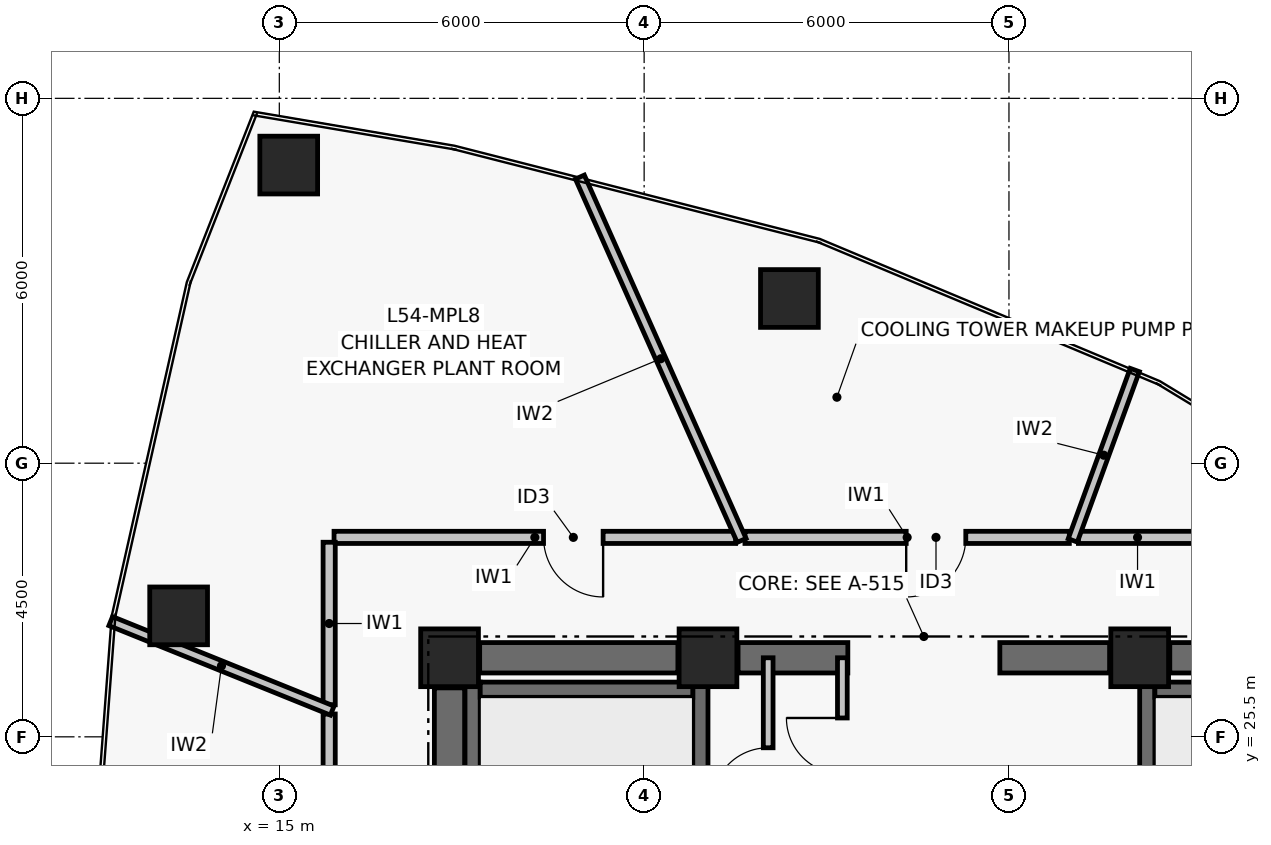
"""IFC4 building model, lengths in metres.
Left out: names, types, materials, properties, quantities, classifications, styles, units other than length and angle.
Written with IfcOpenShell. Run it as: python <this file> out.ifc"""

import sys

from ifc_helpers import new_model, si_unit, direction, frame, frame_2d, origin, origin_2d, place, context, subcontext, project, spatial, rectangle, hollow_rectangle, extrude, element, fill, save


model = new_model("IFC4")
c1 = context("Model", 3, precision=1e-05, world=origin(), true_north=direction((0.0, 1.0)))
c2 = subcontext(c1, "Body", "Model", "MODEL_VIEW")
j1 = project(units=[si_unit("LENGTHUNIT", "METRE"), si_unit("PLANEANGLEUNIT", "RADIAN")], contexts=[c1])
p1 = place(None, origin())
s1 = spatial("IfcSite", under=j1, at=p1, CompositionType="ELEMENT")
p2 = place(p1, origin())
s2 = spatial("IfcBuilding", under=s1, at=p2, CompositionType="ELEMENT")
p3 = place(p2, frame((0.0, 0.0, 213.84)))
s3 = spatial("IfcBuildingStorey", under=s2, at=p3, CompositionType="ELEMENT", Elevation=213.84)
for number, where, z_axis, x_axis in (
    (1, (17.8, 26.8, 0.0), (0.0, 0.0, 1.0), (1.0, 0.0, 0.0)),
    (2, (22.05, 26.8, 0.0), (0.0, 0.0, 1.0), (1.0, 0.0, 0.0)),
    (3, (29.15, 26.8, 0.0), (0.0, 0.0, 1.0), (1.0, 0.0, 0.0)),
):
    element("IfcColumn", number, at=place(p3, frame(where, z_axis=z_axis, x_axis=x_axis)), inside=s3, PredefinedType="COLUMN", context=c2, shape_type="SweptSolid", body=[
        extrude(rectangle(XDim=0.95, YDim=0.95, at=origin_2d()), origin(), (0.0, 0.0, 1.0), 5.7),
    ])
p4 = place(p3, frame((18.295, 26.8, 0.0), z_axis=(0.0, 0.0, 1.0), x_axis=(1.0, 0.0, 0.0)))
e4 = element("IfcWall", 4, at=p4, inside=s3, PredefinedType="SHEAR", context=c2, shape_type="SweptSolid", body=[
    extrude(rectangle(XDim=3.26, YDim=0.5, at=frame_2d((1.63, 0.0))), origin(), (0.0, 0.0, 1.0), 5.48),
])
p5 = place(p3, frame((22.545, 26.8, 0.0), z_axis=(0.0, 0.0, 1.0), x_axis=(1.0, 0.0, 0.0)))
e5 = element("IfcWall", 5, at=p5, inside=s3, PredefinedType="SHEAR", context=c2, shape_type="SweptSolid", body=[
    extrude(rectangle(XDim=1.805, YDim=0.5, at=frame_2d((0.903, 0.0))), origin(), (0.0, 0.0, 1.0), 5.48),
])
p6 = place(p3, frame((26.85, 26.8, 0.0), z_axis=(0.0, 0.0, 1.0), x_axis=(1.0, 0.0, 0.0)))
e6 = element("IfcWall", 6, at=p6, inside=s3, PredefinedType="SHEAR", context=c2, shape_type="SweptSolid", body=[
    extrude(rectangle(XDim=1.805, YDim=0.5, at=frame_2d((0.902, 0.0))), origin(), (0.0, 0.0, 1.0), 5.48),
])
p7 = place(p3, frame((29.645, 26.8, 0.0), z_axis=(0.0, 0.0, 1.0), x_axis=(1.0, 0.0, 0.0)))
e7 = element("IfcWall", 7, at=p7, inside=s3, PredefinedType="SHEAR", context=c2, shape_type="SweptSolid", body=[
    extrude(rectangle(XDim=3.26, YDim=0.5, at=frame_2d((1.63, 0.0))), origin(), (0.0, 0.0, 1.0), 5.48),
])
p8 = place(p3, frame((17.8, 17.695, 0.0), z_axis=(0.0, 0.0, 1.0), x_axis=(0.0, 1.0, 0.0)))
e8 = element("IfcWall", 8, at=p8, inside=s3, PredefinedType="SHEAR", context=c2, shape_type="SweptSolid", body=[
    extrude(rectangle(XDim=8.61, YDim=0.5, at=frame_2d((4.305, 0.0))), origin(), (0.0, 0.0, 1.0), 5.48),
])
p9 = place(p3, frame((18.179, 17.6, 0.0), z_axis=(0.0, 0.0, 1.0), x_axis=(0.0, 1.0, 0.0)))
e9 = element("IfcWall", 9, at=p9, inside=s3, PredefinedType="SHEAR", context=c2, shape_type="SweptSolid", body=[
    extrude(rectangle(XDim=8.8, YDim=0.25, at=frame_2d((4.4, 0.0))), origin(), (0.0, 0.0, 1.0), 5.48),
])
p10 = place(p3, frame((21.925, 17.6, 0.0), z_axis=(0.0, 0.0, 1.0), x_axis=(0.0, 1.0, 0.0)))
e10 = element("IfcWall", 10, at=p10, inside=s3, PredefinedType="SHEAR", context=c2, shape_type="SweptSolid", body=[
    extrude(rectangle(XDim=8.8, YDim=0.25, at=frame_2d((4.4, 0.0))), origin(), (0.0, 0.0, 1.0), 5.48),
])
p11 = place(p10, frame((0.35, 0.0, 0.0)))
e11 = element("IfcOpeningElement", 11, at=p11, cuts=e10, PredefinedType="OPENING", context=c2, shape_type="SweptSolid", body=[
    extrude(rectangle(XDim=1.05, YDim=2.08, at=frame_2d((0.525, 1.04))), frame((0.0, 0.135, 0.0), z_axis=(0.0, -1.0, 0.0), x_axis=(1.0, 0.0, 0.0)), (0.0, 0.0, 1.0), 0.27),
])
p12 = place(p3, frame((18.304, 26.275, 0.0), z_axis=(0.0, 0.0, 1.0), x_axis=(1.0, 0.0, 0.0)))
e12 = element("IfcWall", 12, at=p12, inside=s3, PredefinedType="SHEAR", context=c2, shape_type="SweptSolid", body=[
    extrude(rectangle(XDim=3.496, YDim=0.25, at=frame_2d((1.748, 0.0))), origin(), (0.0, 0.0, 1.0), 5.48),
])
p13 = place(p3, frame((29.275, 17.6, 0.0), z_axis=(0.0, 0.0, 1.0), x_axis=(0.0, 1.0, 0.0)))
e13 = element("IfcWall", 13, at=p13, inside=s3, PredefinedType="SHEAR", context=c2, shape_type="SweptSolid", body=[
    extrude(rectangle(XDim=8.8, YDim=0.25, at=frame_2d((4.4, 0.0))), origin(), (0.0, 0.0, 1.0), 5.48),
])
p14 = place(p13, frame((0.35, 0.0, 0.0)))
e14 = element("IfcOpeningElement", 14, at=p14, cuts=e13, PredefinedType="OPENING", context=c2, shape_type="SweptSolid", body=[
    extrude(rectangle(XDim=1.05, YDim=2.08, at=frame_2d((0.525, 1.04))), frame((0.0, 0.135, 0.0), z_axis=(0.0, -1.0, 0.0), x_axis=(1.0, 0.0, 0.0)), (0.0, 0.0, 1.0), 0.27),
])
p15 = place(p3, frame((29.4, 26.275, 0.0), z_axis=(0.0, 0.0, 1.0), x_axis=(1.0, 0.0, 0.0)))
e15 = element("IfcWall", 15, at=p15, inside=s3, PredefinedType="SHEAR", context=c2, shape_type="SweptSolid", body=[
    extrude(rectangle(XDim=3.496, YDim=0.25, at=frame_2d((1.748, 0.0))), origin(), (0.0, 0.0, 1.0), 5.48),
])
for number, where, z_axis, x_axis in (
    (16, (23.389, 32.708, 0.0), (0.0, 0.0, 1.0), (1.0, 0.0, 0.0)),
    (17, (15.155, 34.903, 0.0), (0.0, 0.0, 1.0), (1.0, 0.0, 0.0)),
    (18, (13.344, 27.489, 0.0), (0.0, 0.0, 1.0), (1.0, 0.0, 0.0)),
):
    element("IfcColumn", number, at=place(p3, frame(where, z_axis=z_axis, x_axis=x_axis)), inside=s3, PredefinedType="COLUMN", context=c2, shape_type="SweptSolid", body=[
        extrude(hollow_rectangle(XDim=0.95, YDim=0.95, WallThickness=0.04, at=origin_2d()), origin(), (0.0, 0.0, 1.0), 5.7),
    ])
p16 = place(p3, frame((23.04, 23.5, 0.0), z_axis=(0.0, 0.0, 1.0), x_axis=(0.0, 1.0, 0.0)))
e19 = element("IfcWall", 19, at=p16, inside=s3, PredefinedType="PARTITIONING", context=c2, shape_type="SweptSolid", body=[
    extrude(rectangle(XDim=3.3, YDim=0.16, at=frame_2d((1.65, 0.0))), origin(), (0.0, 0.0, 1.0), 4.61),
])
p17 = place(p16, frame((0.9, 0.0, 0.0)))
e20 = element("IfcOpeningElement", 20, at=p17, cuts=e19, PredefinedType="OPENING", context=c2, shape_type="SweptSolid", body=[
    extrude(rectangle(XDim=0.92, YDim=2.05, at=frame_2d((0.46, 1.025))), frame((0.0, 0.09, 0.0), z_axis=(0.0, -1.0, 0.0), x_axis=(1.0, 0.0, 0.0)), (0.0, 0.0, 1.0), 0.18),
])
p18 = place(p3, frame((24.26, 24.24, 0.0), z_axis=(0.0, 0.0, 1.0), x_axis=(0.0, 1.0, 0.0)))
e21 = element("IfcWall", 21, at=p18, inside=s3, PredefinedType="PARTITIONING", context=c2, shape_type="SweptSolid", body=[
    extrude(rectangle(XDim=2.56, YDim=0.16, at=frame_2d((1.28, 0.0))), origin(), (0.0, 0.0, 1.0), 4.61),
])
p19 = place(p18, frame((0.65, 0.0, 0.0)))
e22 = element("IfcOpeningElement", 22, at=p19, cuts=e21, PredefinedType="OPENING", context=c2, shape_type="SweptSolid", body=[
    extrude(rectangle(XDim=0.92, YDim=2.05, at=frame_2d((0.46, 1.025))), frame((0.0, 0.09, 0.0), z_axis=(0.0, -1.0, 0.0), x_axis=(1.0, 0.0, 0.0)), (0.0, 0.0, 1.0), 0.18),
])
p20 = place(p3, frame((15.82, 25.876, 0.0), z_axis=(0.0, 0.0, 1.0), x_axis=(0.0, -1.0, 0.0)))
e23 = element("IfcWall", 23, at=p20, inside=s3, PredefinedType="PARTITIONING", context=c2, shape_type="SweptSolid", body=[
    extrude(rectangle(XDim=8.154, YDim=0.2, at=frame_2d((4.077, 0.0))), origin(), (0.0, 0.0, 1.0), 5.48),
])
p21 = place(p20, frame((3.587, 0.0, 0.0)))
e24 = element("IfcOpeningElement", 24, at=p21, cuts=e23, PredefinedType="OPENING", context=c2, shape_type="SweptSolid", body=[
    extrude(rectangle(XDim=0.98, YDim=2.06, at=frame_2d((0.49, 1.03))), frame((0.0, 0.11, 0.0), z_axis=(0.0, -1.0, 0.0), x_axis=(1.0, 0.0, 0.0)), (0.0, 0.0, 1.0), 0.22),
])
p22 = place(p3, frame((30.087, 28.78, 0.0), z_axis=(0.0, 0.0, 1.0), x_axis=(-1.0, 0.0, 0.0)))
e25 = element("IfcWall", 25, at=p22, inside=s3, PredefinedType="PARTITIONING", context=c2, shape_type="SweptSolid", body=[
    extrude(rectangle(XDim=1.945, YDim=0.2, at=frame_2d((0.973, 0.0))), origin(), (0.0, 0.0, 1.0), 4.91),
])
p23 = place(p3, frame((27.993, 28.78, 0.0), z_axis=(0.0, 0.0, 1.0), x_axis=(-1.0, 0.0, 0.0)))
e26 = element("IfcWall", 26, at=p23, inside=s3, PredefinedType="PARTITIONING", context=c2, shape_type="SweptSolid", body=[
    extrude(rectangle(XDim=5.335, YDim=0.2, at=frame_2d((2.667, 0.0))), origin(), (0.0, 0.0, 1.0), 4.71),
])
p24 = place(p23, frame((1.703, 0.0, 0.0)))
e27 = element("IfcOpeningElement", 27, at=p24, cuts=e26, PredefinedType="OPENING", context=c2, shape_type="SweptSolid", body=[
    extrude(rectangle(XDim=0.98, YDim=2.06, at=frame_2d((0.49, 1.03))), frame((0.0, 0.11, 0.0), z_axis=(0.0, -1.0, 0.0), x_axis=(1.0, 0.0, 0.0)), (0.0, 0.0, 1.0), 0.22),
])
p25 = place(p3, frame((22.505, 28.78, 0.0), z_axis=(0.0, 0.0, 1.0), x_axis=(-1.0, 0.0, 0.0)))
e28 = element("IfcWall", 28, at=p25, inside=s3, PredefinedType="PARTITIONING", context=c2, shape_type="SweptSolid", body=[
    extrude(rectangle(XDim=6.605, YDim=0.2, at=frame_2d((3.302, 0.0))), origin(), (0.0, 0.0, 1.0), 4.71),
])
p26 = place(p25, frame((2.179, 0.0, 0.0)))
e29 = element("IfcOpeningElement", 29, at=p26, cuts=e28, PredefinedType="OPENING", context=c2, shape_type="SweptSolid", body=[
    extrude(rectangle(XDim=0.98, YDim=2.06, at=frame_2d((0.49, 1.03))), frame((0.0, 0.11, 0.0), z_axis=(0.0, -1.0, 0.0), x_axis=(1.0, 0.0, 0.0)), (0.0, 0.0, 1.0), 0.22),
])
p27 = place(p3, frame((15.82, 28.7, 0.0), z_axis=(0.0, 0.0, 1.0), x_axis=(0.0, -1.0, 0.0)))
e30 = element("IfcWall", 30, at=p27, inside=s3, PredefinedType="PARTITIONING", context=c2, shape_type="SweptSolid", body=[
    extrude(rectangle(XDim=2.673, YDim=0.2, at=frame_2d((1.336, 0.0))), origin(), (0.0, 0.0, 1.0), 4.71),
])
p28 = place(p3, frame((28.05, 28.73, 0.0), z_axis=(0.0, 0.0, 1.0), x_axis=(0.342045419989, 0.939683420448, 0.0)))
e31 = element("IfcWall", 31, at=p28, inside=s3, PredefinedType="PARTITIONING", context=c2, shape_type="SweptSolid", body=[
    extrude(rectangle(XDim=2.982, YDim=0.16, at=frame_2d((1.491, 0.0))), origin(), (0.0, 0.0, 1.0), 4.91),
])
p29 = place(p3, frame((22.604, 28.73, 0.0), z_axis=(0.0, 0.0, 1.0), x_axis=(-0.406720230642, 0.913552764752, 0.0)))
e32 = element("IfcWall", 32, at=p29, inside=s3, PredefinedType="PARTITIONING", context=c2, shape_type="SweptSolid", body=[
    extrude(rectangle(XDim=6.541, YDim=0.16, at=frame_2d((3.27, 0.0))), origin(), (0.0, 0.0, 1.0), 4.71),
])
p30 = place(p3, frame((15.87, 25.931, 0.0), z_axis=(0.0, 0.0, 1.0), x_axis=(-0.927185393296, 0.374602784905, 0.0)))
e33 = element("IfcWall", 33, at=p30, inside=s3, PredefinedType="PARTITIONING", context=c2, shape_type="SweptSolid", body=[
    extrude(rectangle(XDim=3.929, YDim=0.16, at=frame_2d((1.964, 0.0))), origin(), (0.0, 0.0, 1.0), 4.91),
])
p31 = place(p17, origin())
e34 = element("IfcDoor", 34, at=p31, inside=s3, OperationType="SINGLE_SWING_LEFT", PredefinedType="DOOR", context=c2, shape_type="SweptSolid", body=[
    extrude(rectangle(XDim=0.92, YDim=2.05, at=frame_2d((0.46, 1.025))), frame((0.0, 0.025, 0.0), z_axis=(0.0, -1.0, 0.0), x_axis=(1.0, 0.0, 0.0)), (0.0, 0.0, 1.0), 0.05),
])
fill(e20, e34)
p32 = place(p19, origin())
e35 = element("IfcDoor", 35, at=p32, inside=s3, OperationType="SINGLE_SWING_RIGHT", PredefinedType="DOOR", context=c2, shape_type="SweptSolid", body=[
    extrude(rectangle(XDim=0.92, YDim=2.05, at=frame_2d((0.46, 1.025))), frame((0.0, 0.025, 0.0), z_axis=(0.0, -1.0, 0.0), x_axis=(1.0, 0.0, 0.0)), (0.0, 0.0, 1.0), 0.05),
])
fill(e22, e35)
p33 = place(p24, origin())
e36 = element("IfcDoor", 36, at=p33, inside=s3, OperationType="SINGLE_SWING_RIGHT", PredefinedType="DOOR", context=c2, shape_type="SweptSolid", body=[
    extrude(rectangle(XDim=0.98, YDim=2.06, at=frame_2d((0.49, 1.03))), frame((0.0, 0.025, 0.0), z_axis=(0.0, -1.0, 0.0), x_axis=(1.0, 0.0, 0.0)), (0.0, 0.0, 1.0), 0.05),
])
fill(e27, e36)
p34 = place(p26, origin())
e37 = element("IfcDoor", 37, at=p34, inside=s3, OperationType="SINGLE_SWING_LEFT", PredefinedType="DOOR", context=c2, shape_type="SweptSolid", body=[
    extrude(rectangle(XDim=0.98, YDim=2.06, at=frame_2d((0.49, 1.03))), frame((0.0, 0.025, 0.0), z_axis=(0.0, -1.0, 0.0), x_axis=(1.0, 0.0, 0.0)), (0.0, 0.0, 1.0), 0.05),
])
fill(e29, e37)
save(model, sys.argv[1])
